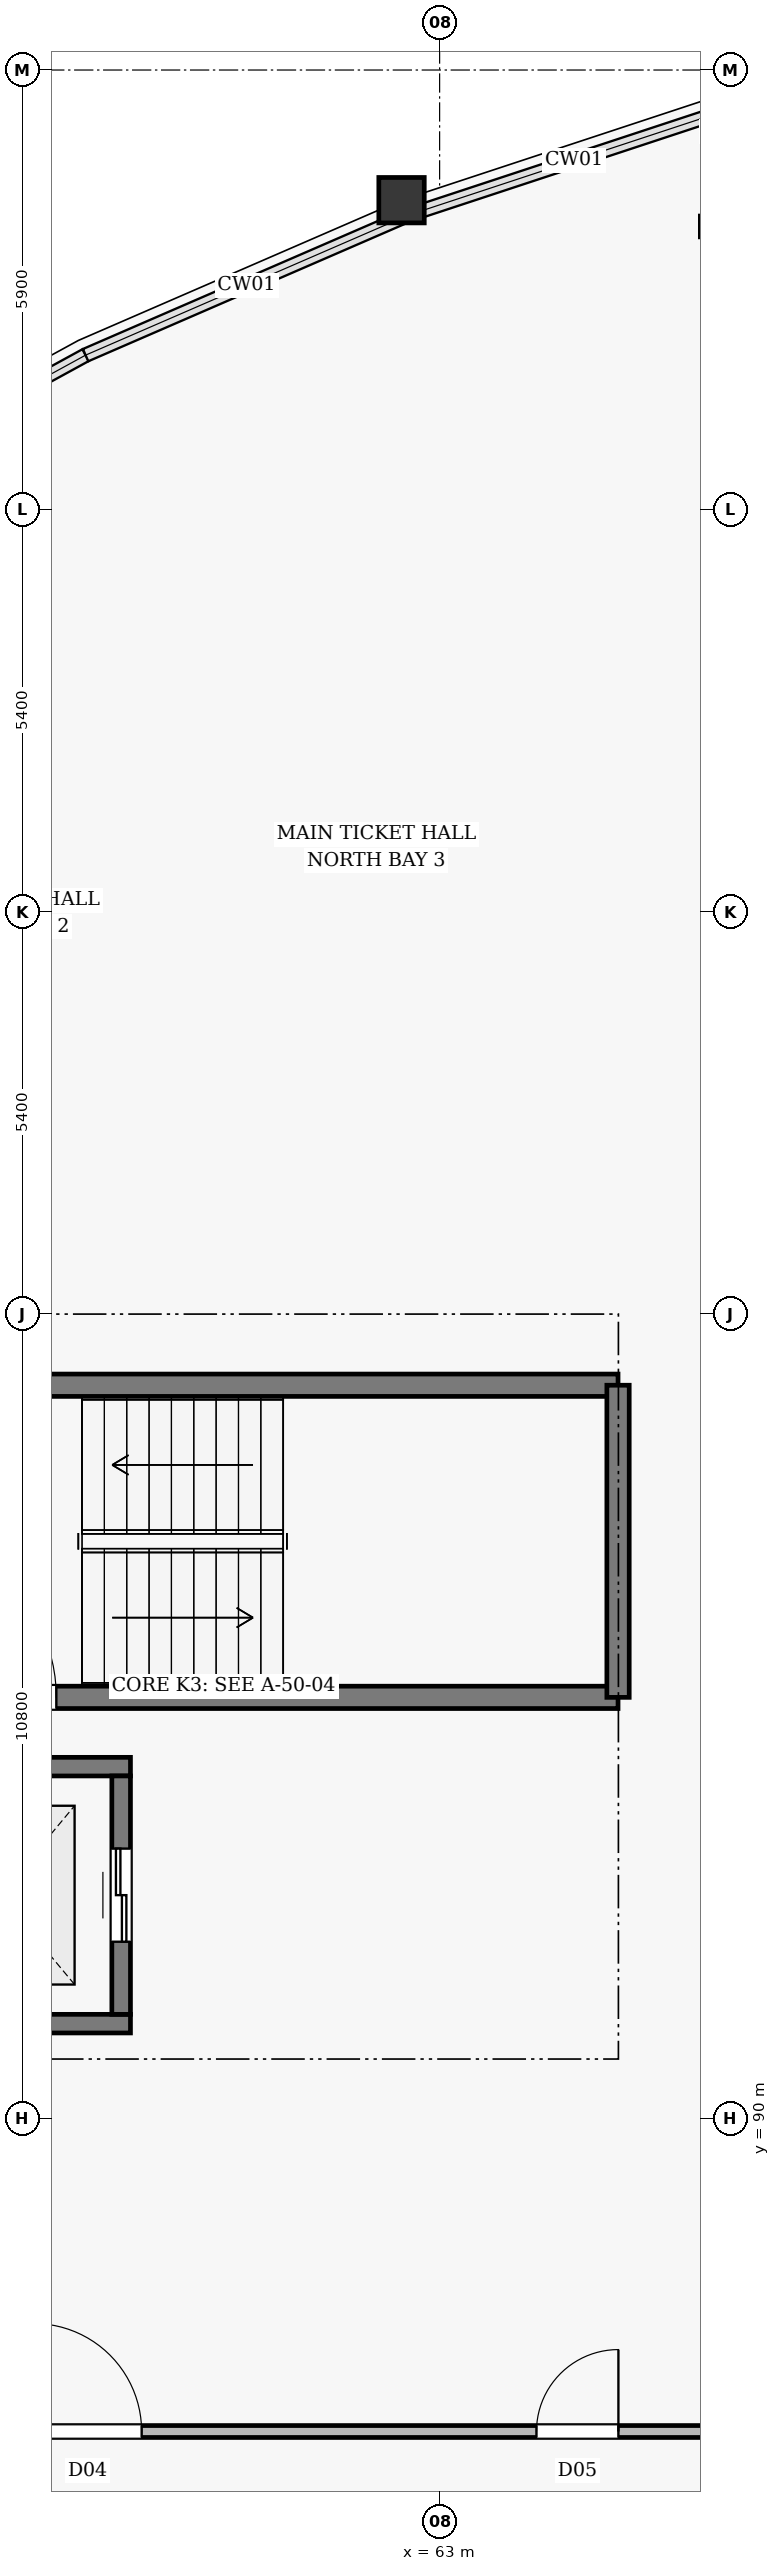
"""IFC4 building model, lengths in metres.
Left out: names, types, materials, properties, quantities, classifications, styles, units other than length and angle.
Written with IfcOpenShell. Run it as: python <this file> out.ifc"""

import sys

from ifc_helpers import new_model, si_unit, direction, frame, frame_2d, origin, origin_2d, place, context, subcontext, project, spatial, rectangle, hollow_circle, extrude, element, fill, save


model = new_model("IFC4")
c1 = context("Model", 3, precision=1e-05, world=origin(), true_north=direction((0.0, 1.0)))
c2 = subcontext(c1, "Body", "Model", "MODEL_VIEW")
j1 = project(units=[si_unit("LENGTHUNIT", "METRE"), si_unit("PLANEANGLEUNIT", "RADIAN")], contexts=[c1])
p1 = place(None, origin())
s1 = spatial("IfcSite", under=j1, at=p1, CompositionType="ELEMENT")
p2 = place(p1, origin())
s2 = spatial("IfcBuilding", under=s1, at=p2, CompositionType="ELEMENT")
p3 = place(p2, origin())
s3 = spatial("IfcBuildingStorey", under=s2, at=p3, CompositionType="ELEMENT", Elevation=0.0)
p4 = place(p3, frame((62.489, 115.753, 0.0), z_axis=(0.0, 0.0, 1.0), x_axis=(1.0, 0.0, 0.0)))
e1 = element("IfcColumn", 1, at=p4, inside=s3, PredefinedType="COLUMN", context=c2, shape_type="SweptSolid", body=[
    extrude(hollow_circle(Radius=0.305, WallThickness=0.02, at=origin_2d()), origin(), (0.0, 0.0, 1.0), 6.6),
])
p5 = place(p3, frame((66.5, 115.4, 0.0), z_axis=(0.0, 0.0, 1.0), x_axis=(1.0, 0.0, 0.0)))
e2 = element("IfcWall", 2, at=p5, inside=s3, PredefinedType="STANDARD", context=c2, shape_type="SweptSolid", body=[
    extrude(rectangle(XDim=4.8, YDim=0.28, at=frame_2d((2.4, 0.0))), origin(), (0.0, 0.0, 1.0), 4.2),
])
p6 = place(p5, frame((0.8, 0.0, 0.005)))
e3 = element("IfcOpeningElement", 3, at=p6, cuts=e2, PredefinedType="OPENING", context=c2, shape_type="SweptSolid", body=[
    extrude(rectangle(XDim=3.2, YDim=2.8, at=frame_2d((1.6, 1.4))), frame((0.0, 0.152, 0.0), z_axis=(0.0, -1.0, 0.0), x_axis=(1.0, 0.0, 0.0)), (0.0, 0.0, 1.0), 0.304),
])
p7 = place(p3, frame((55.355, 95.655, 0.0), z_axis=(0.0, 0.0, 1.0), x_axis=(1.0, 0.0, 0.0)))
e4 = element("IfcWall", 4, at=p7, inside=s3, PredefinedType="SOLIDWALL", context=c2, shape_type="SweptSolid", body=[
    extrude(rectangle(XDim=10.04, YDim=0.3, at=frame_2d((5.02, 0.0))), origin(), (0.0, 0.0, 1.0), 6.6),
])
p8 = place(p7, frame((0.35, 0.0, 0.005)))
e5 = element("IfcOpeningElement", 5, at=p8, cuts=e4, PredefinedType="OPENING", context=c2, shape_type="SweptSolid", body=[
    extrude(rectangle(XDim=2.15, YDim=2.2, at=frame_2d((1.075, 1.1))), frame((0.0, 0.162, 0.0), z_axis=(0.0, -1.0, 0.0), x_axis=(1.0, 0.0, 0.0)), (0.0, 0.0, 1.0), 0.324),
])
p9 = place(p3, frame((55.355, 99.845, 0.0), z_axis=(0.0, 0.0, 1.0), x_axis=(1.0, 0.0, 0.0)))
e6 = element("IfcWall", 6, at=p9, inside=s3, PredefinedType="SOLIDWALL", context=c2, shape_type="SweptSolid", body=[
    extrude(rectangle(XDim=10.04, YDim=0.3, at=frame_2d((5.02, 0.0))), origin(), (0.0, 0.0, 1.0), 6.6),
])
p10 = place(p3, frame((65.395, 95.655, 0.0), z_axis=(0.0, 0.0, 1.0), x_axis=(0.0, 1.0, 0.0)))
e7 = element("IfcWall", 7, at=p10, inside=s3, PredefinedType="SOLIDWALL", context=c2, shape_type="SweptSolid", body=[
    extrude(rectangle(XDim=4.19, YDim=0.3, at=frame_2d((2.095, 0.0))), origin(), (0.0, 0.0, 1.0), 6.6),
])
for number, where, z_axis, x_axis in (
    (8, (55.35, 91.275, 0.0), (0.0, 0.0, 1.0), (1.0, 0.0, 0.0)),
    (9, (55.35, 94.725, 0.0), (0.0, 0.0, 1.0), (1.0, 0.0, 0.0)),
):
    element("IfcWall", number, at=place(p3, frame(where, z_axis=z_axis, x_axis=x_axis)), inside=s3, PredefinedType="SOLIDWALL", context=c2, shape_type="SweptSolid", body=[
        extrude(rectangle(XDim=3.5, YDim=0.25, at=frame_2d((1.75, 0.0))), origin(), (0.0, 0.0, 1.0), 6.6),
    ])
p11 = place(p3, frame((58.725, 91.4, 0.0), z_axis=(0.0, 0.0, 1.0), x_axis=(0.0, 1.0, 0.0)))
e10 = element("IfcWall", 10, at=p11, inside=s3, PredefinedType="SOLIDWALL", context=c2, shape_type="SweptSolid", body=[
    extrude(rectangle(XDim=3.2, YDim=0.25, at=frame_2d((1.6, 0.0))), origin(), (0.0, 0.0, 1.0), 6.6),
])
p12 = place(p11, frame((0.975, 0.0, 0.005)))
e11 = element("IfcOpeningElement", 11, at=p12, cuts=e10, PredefinedType="OPENING", context=c2, shape_type="SweptSolid", body=[
    extrude(rectangle(XDim=1.25, YDim=2.2, at=frame_2d((0.625, 1.1))), frame((0.0, 0.137, 0.0), z_axis=(0.0, -1.0, 0.0), x_axis=(1.0, 0.0, 0.0)), (0.0, 0.0, 1.0), 0.274),
])
p13 = place(p3, frame((54.15, 85.8, 0.0), z_axis=(0.0, 0.0, 1.0), x_axis=(1.0, 0.0, 0.0)))
e12 = element("IfcWall", 12, at=p13, inside=s3, PredefinedType="PARTITIONING", context=c2, shape_type="SweptSolid", body=[
    extrude(rectangle(XDim=17.85, YDim=0.16, at=frame_2d((8.925, 0.0))), origin(), (0.0, 0.0, 1.0), 5.84),
])
p14 = place(p13, frame((3.4, 0.0, 0.005)))
e13 = element("IfcOpeningElement", 13, at=p14, cuts=e12, PredefinedType="OPENING", context=c2, shape_type="SweptSolid", body=[
    extrude(rectangle(XDim=1.45, YDim=2.15, at=frame_2d((0.725, 1.075))), frame((0.0, 0.092, 0.0), z_axis=(0.0, -1.0, 0.0), x_axis=(1.0, 0.0, 0.0)), (0.0, 0.0, 1.0), 0.184),
])
p15 = place(p13, frame((10.15, 0.0, 0.005)))
e14 = element("IfcOpeningElement", 14, at=p15, cuts=e12, PredefinedType="OPENING", context=c2, shape_type="SweptSolid", body=[
    extrude(rectangle(XDim=1.1, YDim=2.1, at=frame_2d((0.55, 1.05))), frame((0.0, 0.092, 0.0), z_axis=(0.0, -1.0, 0.0), x_axis=(1.0, 0.0, 0.0)), (0.0, 0.0, 1.0), 0.184),
])
p16 = place(p8, origin())
e15 = element("IfcDoor", 15, at=p16, inside=s3, OperationType="SINGLE_SWING_LEFT", PredefinedType="DOOR", context=c2, shape_type="SweptSolid", body=[
    extrude(rectangle(XDim=2.15, YDim=2.2, at=frame_2d((1.075, 1.1))), frame((0.0, 0.025, 0.0), z_axis=(0.0, -1.0, 0.0), x_axis=(1.0, 0.0, 0.0)), (0.0, 0.0, 1.0), 0.05),
])
fill(e5, e15)
p17 = place(p12, origin())
e16 = element("IfcDoor", 16, at=p17, inside=s3, OperationType="SLIDING_TO_LEFT", PredefinedType="DOOR", context=c2, shape_type="SweptSolid", body=[
    extrude(rectangle(XDim=1.25, YDim=2.2, at=frame_2d((0.625, 1.1))), frame((0.0, 0.025, 0.0), z_axis=(0.0, -1.0, 0.0), x_axis=(1.0, 0.0, 0.0)), (0.0, 0.0, 1.0), 0.05),
])
fill(e11, e16)
p18 = place(p14, origin())
e17 = element("IfcDoor", 17, at=p18, inside=s3, OperationType="SINGLE_SWING_LEFT", PredefinedType="DOOR", context=c2, shape_type="SweptSolid", body=[
    extrude(rectangle(XDim=1.45, YDim=2.15, at=frame_2d((0.725, 1.075))), frame((0.0, 0.025, 0.0), z_axis=(0.0, -1.0, 0.0), x_axis=(1.0, 0.0, 0.0)), (0.0, 0.0, 1.0), 0.05),
])
fill(e13, e17)
p19 = place(p15, origin())
e18 = element("IfcDoor", 18, at=p19, inside=s3, OperationType="SINGLE_SWING_RIGHT", PredefinedType="DOOR", context=c2, shape_type="SweptSolid", body=[
    extrude(rectangle(XDim=1.1, YDim=2.1, at=frame_2d((0.55, 1.05))), frame((0.0, 0.025, 0.0), z_axis=(0.0, -1.0, 0.0), x_axis=(1.0, 0.0, 0.0)), (0.0, 0.0, 1.0), 0.05),
])
fill(e14, e18)
save(model, sys.argv[1])
